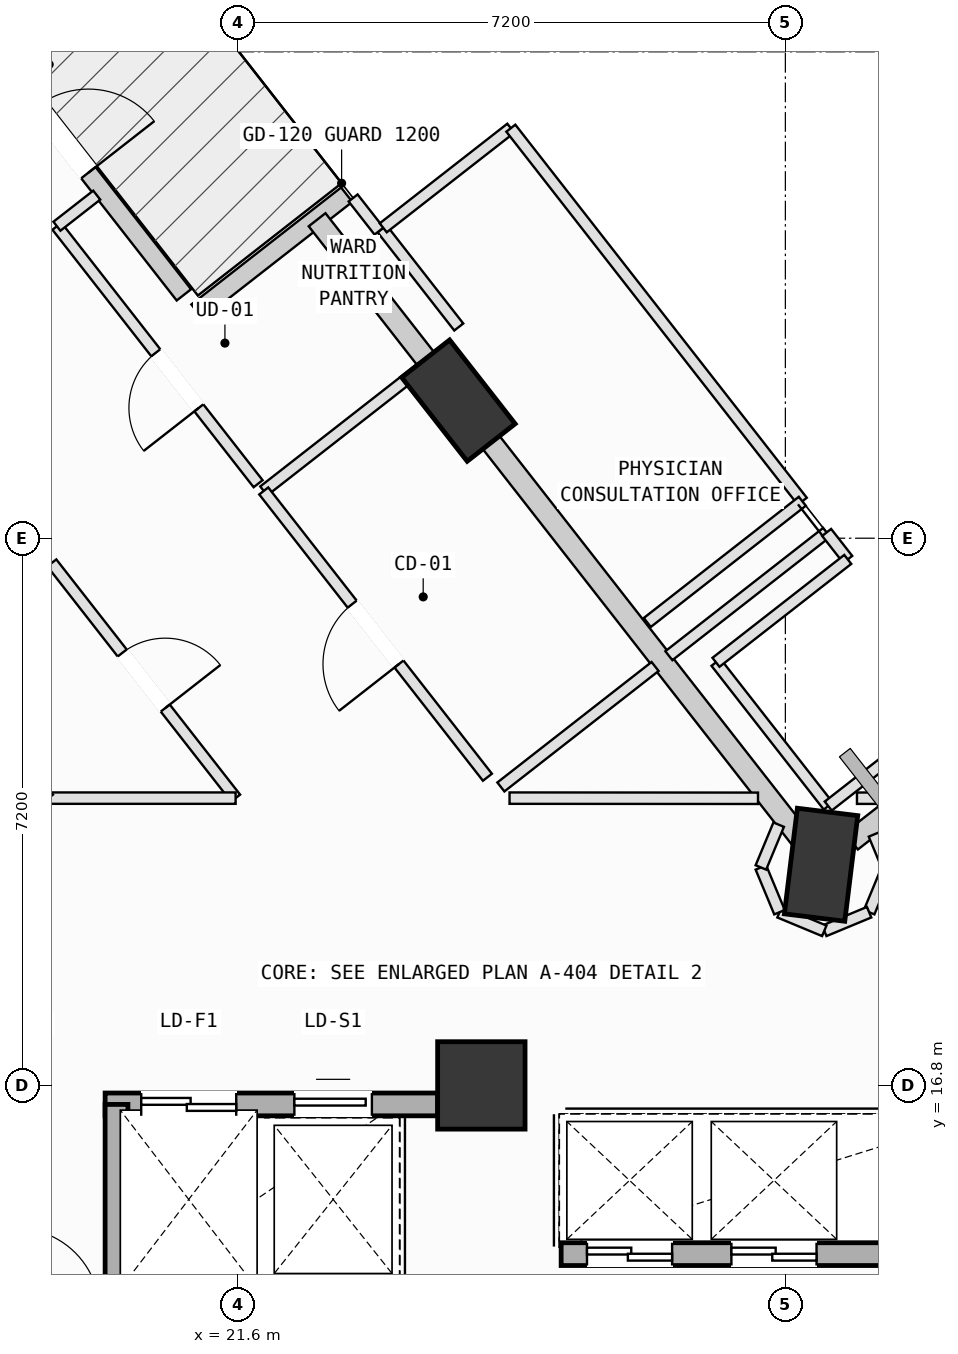
"""IFC4 building model, lengths in metres.
Left out: names, types, materials, properties, quantities, classifications, styles, units other than length and angle.
Written with IfcOpenShell. Run it as: python <this file> out.ifc"""

import sys

from ifc_helpers import new_model, si_unit, direction, frame, frame_2d, origin, origin_2d, place, context, subcontext, project, spatial, rectangle, extrude, element, fill, save


model = new_model("IFC4")
c1 = context("Model", 3, precision=1e-05, world=origin(), true_north=direction((0.0, 1.0)))
c2 = subcontext(c1, "Body", "Model", "MODEL_VIEW")
j1 = project(units=[si_unit("LENGTHUNIT", "METRE"), si_unit("PLANEANGLEUNIT", "RADIAN")], contexts=[c1])
p1 = place(None, origin())
s1 = spatial("IfcSite", under=j1, at=p1, CompositionType="ELEMENT")
p2 = place(p1, origin())
s2 = spatial("IfcBuilding", under=s1, at=p2, CompositionType="ELEMENT")
p3 = place(p2, frame((0.0, 0.0, 185.8)))
s3 = spatial("IfcBuildingStorey", under=s2, at=p3, CompositionType="ELEMENT", Elevation=185.8)
p4 = place(p3, frame((24.8, 16.8, 0.0), z_axis=(0.0, 0.0, 1.0), x_axis=(1.0, 0.0, 0.0)))
e1 = element("IfcColumn", 1, at=p4, inside=s3, PredefinedType="COLUMN", context=c2, shape_type="SweptSolid", body=[
    extrude(rectangle(XDim=1.15, YDim=1.15, at=origin_2d()), origin(), (0.0, 0.0, 1.0), 4.0),
])
p5 = place(p3, frame((29.27, 19.704, 0.002), z_axis=(0.021251539031, -0.0177706835, 0.999616213802), x_axis=(-0.682948414235, 0.729948927181, 0.027495948803)))
e2 = element("IfcColumn", 2, at=p5, inside=s3, PredefinedType="COLUMN", context=c2, shape_type="SweptSolid", body=[
    extrude(rectangle(XDim=1.4, YDim=0.8, at=origin_2d()), origin(), (0.0, 0.0, 1.0), 3.998),
])
p6 = place(p3, frame((24.498, 25.811, 0.002), z_axis=(-0.003845969984, -0.037727134127, 0.99928067722), x_axis=(-0.532627653931, 0.845821943945, 0.029883463813)))
e3 = element("IfcColumn", 3, at=p6, inside=s3, PredefinedType="COLUMN", context=c2, shape_type="SweptSolid", body=[
    extrude(rectangle(XDim=1.4, YDim=0.8, at=origin_2d()), origin(), (0.0, 0.0, 1.0), 3.999),
])
p7 = place(p3, frame((16.601, 32.686, 0.0), z_axis=(0.0, 0.0, 1.0), x_axis=(0.615648806913, -0.788020651091, 0.0)))
e4 = element("IfcWall", 4, at=p7, inside=s3, PredefinedType="SOLIDWALL", context=c2, shape_type="SweptSolid", body=[
    extrude(rectangle(XDim=6.96, YDim=0.24, at=frame_2d((3.48, 0.0))), origin(), (0.0, 0.0, 1.0), 3.265),
])
p8 = place(p7, frame((3.82, 0.0, 0.0)))
e5 = element("IfcOpeningElement", 5, at=p8, cuts=e4, PredefinedType="OPENING", context=c2, shape_type="SweptSolid", body=[
    extrude(rectangle(XDim=1.1, YDim=2.15, at=frame_2d((0.55, 1.075))), frame((0.0, 0.13, 0.0), z_axis=(0.0, -1.0, 0.0), x_axis=(1.0, 0.0, 0.0)), (0.0, 0.0, 1.0), 0.26),
])
p9 = place(p3, frame((21.059, 26.981, 0.0), z_axis=(0.0, 0.0, 1.0), x_axis=(0.788019931913, 0.615649727448, 0.0)))
e6 = element("IfcWall", 6, at=p9, inside=s3, PredefinedType="SOLIDWALL", context=c2, shape_type="SweptSolid", body=[
    extrude(rectangle(XDim=2.5, YDim=0.24, at=frame_2d((1.25, 0.0))), origin(), (0.0, 0.0, 1.0), 3.265),
])
p10 = place(p3, frame((29.667, 20.014, 0.0), z_axis=(0.0, 0.0, 1.0), x_axis=(0.788002637329, 0.615671863547, 0.0)))
e7 = element("IfcWall", 7, at=p10, inside=s3, PredefinedType="SOLIDWALL", context=c2, shape_type="SweptSolid", body=[
    extrude(rectangle(XDim=5.96, YDim=0.28, at=frame_2d((2.98, 0.0))), origin(), (0.0, 0.0, 1.0), 3.265),
])
p11 = place(p3, frame((28.998, 20.052, 0.0), z_axis=(0.0, 0.0, 1.0), x_axis=(-0.615664366432, 0.788008494819, 0.0)))
e8 = element("IfcWall", 8, at=p11, inside=s3, PredefinedType="SOLIDWALL", context=c2, shape_type="SweptSolid", body=[
    extrude(rectangle(XDim=6.76, YDim=0.28, at=frame_2d((3.38, 0.0))), origin(), (0.0, 0.0, 1.0), 3.265),
])
p12 = place(p3, frame((24.228, 26.156, 0.0), z_axis=(0.0, 0.0, 1.0), x_axis=(-0.615726632645, 0.787959842791, 0.0)))
e9 = element("IfcWall", 9, at=p12, inside=s3, PredefinedType="SOLIDWALL", context=c2, shape_type="SweptSolid", body=[
    extrude(rectangle(XDim=2.581, YDim=0.28, at=frame_2d((1.291, 0.0))), origin(), (0.0, 0.0, 1.0), 3.245),
])
p13 = place(p3, frame((19.85, 16.55, 0.0), z_axis=(0.0, 0.0, 1.0), x_axis=(1.0, 0.0, 0.0)))
e10 = element("IfcWall", 10, at=p13, inside=s3, PredefinedType="SOLIDWALL", context=c2, shape_type="SweptSolid", body=[
    extrude(rectangle(XDim=4.375, YDim=0.3, at=frame_2d((2.188, 0.0))), origin(), (0.0, 0.0, 1.0), 3.78),
])
p14 = place(p13, frame((0.475, 0.0, 0.0)))
e11 = element("IfcOpeningElement", 11, at=p14, cuts=e10, PredefinedType="OPENING", context=c2, shape_type="SweptSolid", body=[
    extrude(rectangle(XDim=1.25, YDim=2.18, at=frame_2d((0.625, 1.09))), frame((0.0, 0.16, 0.0), z_axis=(0.0, -1.0, 0.0), x_axis=(1.0, 0.0, 0.0)), (0.0, 0.0, 1.0), 0.32),
])
p15 = place(p13, frame((2.49, 0.0, 0.0)))
e12 = element("IfcOpeningElement", 12, at=p15, cuts=e10, PredefinedType="OPENING", context=c2, shape_type="SweptSolid", body=[
    extrude(rectangle(XDim=1.02, YDim=2.12, at=frame_2d((0.51, 1.06))), frame((0.0, 0.16, 0.0), z_axis=(0.0, -1.0, 0.0), x_axis=(1.0, 0.0, 0.0)), (0.0, 0.0, 1.0), 0.32),
])
p16 = place(p3, frame((20.0, 13.82, 0.0), z_axis=(0.0, 0.0, 1.0), x_axis=(0.0, 1.0, 0.0)))
e13 = element("IfcWall", 13, at=p16, inside=s3, PredefinedType="SOLIDWALL", context=c2, shape_type="SweptSolid", body=[
    extrude(rectangle(XDim=2.73, YDim=0.3, at=frame_2d((1.365, 0.0))), origin(), (0.0, 0.0, 1.0), 3.78),
])
p17 = place(p3, frame((25.85, 14.58, 0.0), z_axis=(0.0, 0.0, 1.0), x_axis=(1.0, 0.0, 0.0)))
e14 = element("IfcWall", 14, at=p17, inside=s3, PredefinedType="SOLIDWALL", context=c2, shape_type="SweptSolid", body=[
    extrude(rectangle(XDim=5.45, YDim=0.3, at=frame_2d((2.725, 0.0))), origin(), (0.0, 0.0, 1.0), 3.78),
])
p18 = place(p17, frame((0.34, 0.0, 0.0)))
e15 = element("IfcOpeningElement", 15, at=p18, cuts=e14, PredefinedType="OPENING", context=c2, shape_type="SweptSolid", body=[
    extrude(rectangle(XDim=1.12, YDim=2.15, at=frame_2d((0.56, 1.075))), frame((0.0, 0.16, 0.0), z_axis=(0.0, -1.0, 0.0), x_axis=(1.0, 0.0, 0.0)), (0.0, 0.0, 1.0), 0.32),
])
p19 = place(p17, frame((2.24, 0.0, 0.0)))
e16 = element("IfcOpeningElement", 16, at=p19, cuts=e14, PredefinedType="OPENING", context=c2, shape_type="SweptSolid", body=[
    extrude(rectangle(XDim=1.12, YDim=2.15, at=frame_2d((0.56, 1.075))), frame((0.0, 0.16, 0.0), z_axis=(0.0, -1.0, 0.0), x_axis=(1.0, 0.0, 0.0)), (0.0, 0.0, 1.0), 0.32),
])
p20 = place(p3, frame((27.887, 22.367, 0.0), z_axis=(0.0, 0.0, 1.0), x_axis=(0.615594676938, -0.788062937667, 0.0)))
e17 = element("IfcWall", 17, at=p20, inside=s3, PredefinedType="PARTITIONING", context=c2, shape_type="SweptSolid", body=[
    extrude(rectangle(XDim=2.399, YDim=0.15, at=frame_2d((1.2, 0.0))), origin(), (0.0, 0.0, 1.0), 3.78),
])
p21 = place(p3, frame((29.364, 20.476, 0.0), z_axis=(0.0, 0.0, 1.0), x_axis=(0.788027038921, 0.615640630505, 0.0)))
e18 = element("IfcWall", 18, at=p21, inside=s3, PredefinedType="PARTITIONING", context=c2, shape_type="SweptSolid", body=[
    extrude(rectangle(XDim=6.944, YDim=0.15, at=frame_2d((3.472, 0.0))), origin(), (0.0, 0.0, 1.0), 3.78),
])
p22 = place(p3, frame((30.204, 20.579, 0.0), z_axis=(0.0, 0.0, 1.0), x_axis=(-1.0, 0.0, 0.0)))
e19 = element("IfcWall", 19, at=p22, inside=s3, PredefinedType="PARTITIONING", context=c2, shape_type="SweptSolid", body=[
    extrude(rectangle(XDim=0.462, YDim=0.15, at=frame_2d((0.231, 0.0))), origin(), (0.0, 0.0, 1.0), 3.78),
])
p23 = place(p3, frame((29.966, 20.102, 0.0), z_axis=(0.0, 0.0, 1.0), x_axis=(0.382917701472, -0.923782460268, 0.0)))
e20 = element("IfcWall", 20, at=p23, inside=s3, PredefinedType="PARTITIONING", context=c2, shape_type="SweptSolid", body=[
    extrude(rectangle(XDim=0.47, YDim=0.15, at=frame_2d((0.235, 0.0))), origin(), (0.0, 0.0, 1.0), 3.78),
])
p24 = place(p3, frame((30.146, 19.668, 0.0), z_axis=(0.0, 0.0, 1.0), x_axis=(-0.382656259044, -0.923890787601, 0.0)))
e21 = element("IfcWall", 21, at=p24, inside=s3, PredefinedType="PARTITIONING", context=c2, shape_type="SweptSolid", body=[
    extrude(rectangle(XDim=0.637, YDim=0.15, at=frame_2d((0.319, 0.0))), origin(), (0.0, 0.0, 1.0), 3.78),
])
p25 = place(p3, frame((29.902, 19.079, 0.0), z_axis=(0.0, 0.0, 1.0), x_axis=(-0.923494633817, -0.383611341478, 0.0)))
e22 = element("IfcWall", 22, at=p25, inside=s3, PredefinedType="PARTITIONING", context=c2, shape_type="SweptSolid", body=[
    extrude(rectangle(XDim=0.639, YDim=0.15, at=frame_2d((0.319, 0.0))), origin(), (0.0, 0.0, 1.0), 3.415),
])
p26 = place(p3, frame((29.312, 18.834, 0.0), z_axis=(0.0, 0.0, 1.0), x_axis=(-0.92326925104, 0.384153472045, 0.0)))
e23 = element("IfcWall", 23, at=p26, inside=s3, PredefinedType="PARTITIONING", context=c2, shape_type="SweptSolid", body=[
    extrude(rectangle(XDim=0.638, YDim=0.15, at=frame_2d((0.319, 0.0))), origin(), (0.0, 0.0, 1.0), 3.78),
])
p27 = place(p3, frame((28.723, 19.079, 0.0), z_axis=(0.0, 0.0, 1.0), x_axis=(-0.383962918333, 0.92334851348, 0.0)))
e24 = element("IfcWall", 24, at=p27, inside=s3, PredefinedType="PARTITIONING", context=c2, shape_type="SweptSolid", body=[
    extrude(rectangle(XDim=0.638, YDim=0.15, at=frame_2d((0.319, 0.0))), origin(), (0.0, 0.0, 1.0), 3.78),
])
p28 = place(p3, frame((28.478, 19.668, 0.0), z_axis=(0.0, 0.0, 1.0), x_axis=(0.383648363286, 0.923479254422, 0.0)))
e25 = element("IfcWall", 25, at=p28, inside=s3, PredefinedType="PARTITIONING", context=c2, shape_type="SweptSolid", body=[
    extrude(rectangle(XDim=0.61, YDim=0.15, at=frame_2d((0.305, 0.0))), origin(), (0.0, 0.0, 1.0), 3.78),
])
p29 = place(p3, frame((28.44, 20.578, 0.0), z_axis=(0.0, 0.0, 1.0), x_axis=(-0.999999774112, 0.000672143239, 0.0)))
e26 = element("IfcWall", 26, at=p29, inside=s3, PredefinedType="PARTITIONING", context=c2, shape_type="SweptSolid", body=[
    extrude(rectangle(XDim=3.269, YDim=0.15, at=frame_2d((1.635, 0.0))), origin(), (0.0, 0.0, 1.0), 3.78),
])
p30 = place(p3, frame((25.057, 20.727, 0.0), z_axis=(0.0, 0.0, 1.0), x_axis=(0.788068936461, 0.615586997414, 0.0)))
e27 = element("IfcWall", 27, at=p30, inside=s3, PredefinedType="PARTITIONING", context=c2, shape_type="SweptSolid", body=[
    extrude(rectangle(XDim=2.575, YDim=0.15, at=frame_2d((1.287, 0.0))), origin(), (0.0, 0.0, 1.0), 3.78),
])
p31 = place(p3, frame((27.267, 22.454, 0.0), z_axis=(0.0, 0.0, 1.0), x_axis=(0.788022968691, 0.615645840411, 0.0)))
e28 = element("IfcWall", 28, at=p31, inside=s3, PredefinedType="PARTITIONING", context=c2, shape_type="SweptSolid", body=[
    extrude(rectangle(XDim=2.634, YDim=0.15, at=frame_2d((1.317, 0.0))), origin(), (0.0, 0.0, 1.0), 3.78),
])
p32 = place(p3, frame((29.343, 24.076, 0.0), z_axis=(0.0, 0.0, 1.0), x_axis=(0.616673159564, -0.787219292366, 0.0)))
e29 = element("IfcWall", 29, at=p32, inside=s3, PredefinedType="PARTITIONING", context=c2, shape_type="SweptSolid", body=[
    extrude(rectangle(XDim=0.451, YDim=0.15, at=frame_2d((0.226, 0.0))), origin(), (0.0, 0.0, 1.0), 3.78),
])
p33 = place(p3, frame((29.621, 23.721, 0.0), z_axis=(0.0, 0.0, 1.0), x_axis=(-0.788197623087, -0.615422218449, 0.0)))
e30 = element("IfcWall", 30, at=p33, inside=s3, PredefinedType="PARTITIONING", context=c2, shape_type="SweptSolid", body=[
    extrude(rectangle(XDim=2.2, YDim=0.15, at=frame_2d((1.1, 0.0))), origin(), (0.0, 0.0, 1.0), 3.78),
])
p34 = place(p3, frame((21.937, 24.622, 0.0), z_axis=(0.0, 0.0, 1.0), x_axis=(0.788163411112, 0.615466032681, 0.0)))
e31 = element("IfcWall", 31, at=p34, inside=s3, PredefinedType="PARTITIONING", context=c2, shape_type="SweptSolid", body=[
    extrude(rectangle(XDim=2.635, YDim=0.15, at=frame_2d((1.317, 0.0))), origin(), (0.0, 0.0, 1.0), 3.78),
])
p35 = place(p3, frame((24.88, 20.855, 0.0), z_axis=(0.0, 0.0, 1.0), x_axis=(-0.61562223779, 0.788041407756, 0.0)))
e32 = element("IfcWall", 32, at=p35, inside=s3, PredefinedType="PARTITIONING", context=c2, shape_type="SweptSolid", body=[
    extrude(rectangle(XDim=4.78, YDim=0.15, at=frame_2d((2.39, 0.0))), origin(), (0.0, 0.0, 1.0), 3.415),
])
p36 = place(p35, frame((1.89, 0.0, 0.0)))
e33 = element("IfcOpeningElement", 33, at=p36, cuts=e32, PredefinedType="OPENING", context=c2, shape_type="SweptSolid", body=[
    extrude(rectangle(XDim=1.0, YDim=2.12, at=frame_2d((0.5, 1.06))), frame((0.0, 0.085, 0.0), z_axis=(0.0, -1.0, 0.0), x_axis=(1.0, 0.0, 0.0)), (0.0, 0.0, 1.0), 0.17),
])
p37 = place(p3, frame((23.494, 28.071, 0.0), z_axis=(0.0, 0.0, 1.0), x_axis=(0.615516872189, -0.788123708596, 0.0)))
e34 = element("IfcWall", 34, at=p37, inside=s3, PredefinedType="PARTITIONING", context=c2, shape_type="SweptSolid", body=[
    extrude(rectangle(XDim=1.639, YDim=0.15, at=frame_2d((0.82, 0.0))), origin(), (0.0, 0.0, 1.0), 3.78),
])
p38 = place(p3, frame((21.863, 24.717, 0.0), z_axis=(0.0, 0.0, 1.0), x_axis=(-0.615664978925, 0.788008016283, 0.0)))
e35 = element("IfcWall", 35, at=p38, inside=s3, PredefinedType="PARTITIONING", context=c2, shape_type="SweptSolid", body=[
    extrude(rectangle(XDim=4.299, YDim=0.15, at=frame_2d((2.15, 0.0))), origin(), (0.0, 0.0, 1.0), 3.78),
])
p39 = place(p38, frame((1.267, 0.0, 0.0)))
e36 = element("IfcOpeningElement", 36, at=p39, cuts=e35, PredefinedType="OPENING", context=c2, shape_type="SweptSolid", body=[
    extrude(rectangle(XDim=0.92, YDim=2.1, at=frame_2d((0.46, 1.05))), frame((0.0, 0.085, 0.0), z_axis=(0.0, -1.0, 0.0), x_axis=(1.0, 0.0, 0.0)), (0.0, 0.0, 1.0), 0.17),
])
p40 = place(p3, frame((19.216, 28.105, 0.0), z_axis=(0.0, 0.0, 1.0), x_axis=(0.78830274662, 0.615287558522, 0.0)))
e37 = element("IfcWall", 37, at=p40, inside=s3, PredefinedType="PARTITIONING", context=c2, shape_type="SweptSolid", body=[
    extrude(rectangle(XDim=0.665, YDim=0.15, at=frame_2d((0.332, 0.0))), origin(), (0.0, 0.0, 1.0), 3.78),
])
p41 = place(p3, frame((23.113, 28.477, 0.0), z_axis=(0.0, 0.0, 1.0), x_axis=(0.616106085267, -0.78766318417, 0.0)))
e38 = element("IfcWall", 38, at=p41, inside=s3, PredefinedType="PARTITIONING", context=c2, shape_type="SweptSolid", body=[
    extrude(rectangle(XDim=0.553, YDim=0.15, at=frame_2d((0.277, 0.0))), origin(), (0.0, 0.0, 1.0), 3.78),
])
p42 = place(p3, frame((19.149, 23.675, 0.0), z_axis=(0.0, 0.0, 1.0), x_axis=(0.615647660829, -0.788021546479, 0.0)))
e39 = element("IfcWall", 39, at=p42, inside=s3, PredefinedType="PARTITIONING", context=c2, shape_type="SweptSolid", body=[
    extrude(rectangle(XDim=3.927, YDim=0.15, at=frame_2d((1.964, 0.0))), origin(), (0.0, 0.0, 1.0), 3.78),
])
p43 = place(p42, frame((1.504, 0.0, 0.0)))
e40 = element("IfcOpeningElement", 40, at=p43, cuts=e39, PredefinedType="OPENING", context=c2, shape_type="SweptSolid", body=[
    extrude(rectangle(XDim=0.92, YDim=2.1, at=frame_2d((0.46, 1.05))), frame((0.0, 0.085, 0.0), z_axis=(0.0, -1.0, 0.0), x_axis=(1.0, 0.0, 0.0)), (0.0, 0.0, 1.0), 0.17),
])
p44 = place(p3, frame((21.567, 20.58, 0.0), z_axis=(0.0, 0.0, 1.0), x_axis=(-1.0, 0.0, 0.0)))
e41 = element("IfcWall", 41, at=p44, inside=s3, PredefinedType="PARTITIONING", context=c2, shape_type="SweptSolid", body=[
    extrude(rectangle(XDim=2.462, YDim=0.15, at=frame_2d((1.231, 0.0))), origin(), (0.0, 0.0, 1.0), 3.78),
])
p45 = place(p3, frame((19.105, 20.58, 0.0), z_axis=(0.0, 0.0, 1.0), x_axis=(-0.615451869475, 0.788174470761, 0.0)))
e42 = element("IfcWall", 42, at=p45, inside=s3, PredefinedType="PARTITIONING", context=c2, shape_type="SweptSolid", body=[
    extrude(rectangle(XDim=2.392, YDim=0.15, at=frame_2d((1.196, 0.0))), origin(), (0.0, 0.0, 1.0), 3.78),
])
p46 = place(p3, frame((23.509, 28.084, 0.0), z_axis=(0.0, 0.0, 1.0), x_axis=(0.788172044174, 0.615454977056, 0.0)))
e43 = element("IfcWall", 43, at=p46, inside=s3, PredefinedType="PARTITIONING", context=c2, shape_type="SweptSolid", body=[
    extrude(rectangle(XDim=2.13, YDim=0.15, at=frame_2d((1.065, 0.0))), origin(), (0.0, 0.0, 1.0), 3.78),
])
p47 = place(p3, frame((25.188, 29.395, 0.0), z_axis=(0.0, 0.0, 1.0), x_axis=(0.615629591414, -0.78803566301, 0.0)))
e44 = element("IfcWall", 44, at=p47, inside=s3, PredefinedType="PARTITIONING", context=c2, shape_type="SweptSolid", body=[
    extrude(rectangle(XDim=6.229, YDim=0.15, at=frame_2d((3.115, 0.0))), origin(), (0.0, 0.0, 1.0), 3.78),
])
p48 = place(p3, frame((29.023, 24.486, 0.0), z_axis=(0.0, 0.0, 1.0), x_axis=(-0.787801343925, -0.615929413578, 0.0)))
e45 = element("IfcWall", 45, at=p48, inside=s3, PredefinedType="PARTITIONING", context=c2, shape_type="SweptSolid", body=[
    extrude(rectangle(XDim=2.59, YDim=0.15, at=frame_2d((1.295, 0.0))), origin(), (0.0, 0.0, 1.0), 3.78),
])
p49 = place(p8, origin())
e46 = element("IfcDoor", 46, at=p49, inside=s3, OperationType="SINGLE_SWING_RIGHT", PredefinedType="DOOR", context=c2, shape_type="SweptSolid", body=[
    extrude(rectangle(XDim=1.1, YDim=2.15, at=frame_2d((0.55, 1.075))), frame((0.0, 0.025, 0.0), z_axis=(0.0, -1.0, 0.0), x_axis=(1.0, 0.0, 0.0)), (0.0, 0.0, 1.0), 0.05),
])
fill(e5, e46)
p50 = place(p18, origin())
e47 = element("IfcDoor", 47, at=p50, inside=s3, OperationType="DOUBLE_DOOR_SLIDING", PredefinedType="DOOR", context=c2, shape_type="SweptSolid", body=[
    extrude(rectangle(XDim=1.12, YDim=2.15, at=frame_2d((0.56, 1.075))), frame((0.0, 0.025, 0.0), z_axis=(0.0, -1.0, 0.0), x_axis=(1.0, 0.0, 0.0)), (0.0, 0.0, 1.0), 0.05),
])
fill(e15, e47)
p51 = place(p19, origin())
e48 = element("IfcDoor", 48, at=p51, inside=s3, OperationType="DOUBLE_DOOR_SLIDING", PredefinedType="DOOR", context=c2, shape_type="SweptSolid", body=[
    extrude(rectangle(XDim=1.12, YDim=2.15, at=frame_2d((0.56, 1.075))), frame((0.0, 0.025, 0.0), z_axis=(0.0, -1.0, 0.0), x_axis=(1.0, 0.0, 0.0)), (0.0, 0.0, 1.0), 0.05),
])
fill(e16, e48)
p52 = place(p14, origin())
e49 = element("IfcDoor", 49, at=p52, inside=s3, OperationType="DOUBLE_DOOR_SLIDING", PredefinedType="DOOR", context=c2, shape_type="SweptSolid", body=[
    extrude(rectangle(XDim=1.25, YDim=2.18, at=frame_2d((0.625, 1.09))), frame((0.0, 0.025, 0.0), z_axis=(0.0, -1.0, 0.0), x_axis=(1.0, 0.0, 0.0)), (0.0, 0.0, 1.0), 0.05),
])
fill(e11, e49)
p53 = place(p15, origin())
e50 = element("IfcDoor", 50, at=p53, inside=s3, OperationType="SLIDING_TO_LEFT", PredefinedType="DOOR", context=c2, shape_type="SweptSolid", body=[
    extrude(rectangle(XDim=1.02, YDim=2.12, at=frame_2d((0.51, 1.06))), frame((0.0, 0.025, 0.0), z_axis=(0.0, -1.0, 0.0), x_axis=(1.0, 0.0, 0.0)), (0.0, 0.0, 1.0), 0.05),
])
fill(e12, e50)
p54 = place(p36, origin())
e51 = element("IfcDoor", 51, at=p54, inside=s3, OperationType="SINGLE_SWING_LEFT", PredefinedType="DOOR", context=c2, shape_type="SweptSolid", body=[
    extrude(rectangle(XDim=1.0, YDim=2.12, at=frame_2d((0.5, 1.06))), frame((0.0, 0.025, 0.0), z_axis=(0.0, -1.0, 0.0), x_axis=(1.0, 0.0, 0.0)), (0.0, 0.0, 1.0), 0.05),
])
fill(e33, e51)
p55 = place(p39, origin())
e52 = element("IfcDoor", 52, at=p55, inside=s3, OperationType="SINGLE_SWING_LEFT", PredefinedType="DOOR", context=c2, shape_type="SweptSolid", body=[
    extrude(rectangle(XDim=0.92, YDim=2.1, at=frame_2d((0.46, 1.05))), frame((0.0, 0.025, 0.0), z_axis=(0.0, -1.0, 0.0), x_axis=(1.0, 0.0, 0.0)), (0.0, 0.0, 1.0), 0.05),
])
fill(e36, e52)
p56 = place(p43, origin())
e53 = element("IfcDoor", 53, at=p56, inside=s3, OperationType="SINGLE_SWING_RIGHT", PredefinedType="DOOR", context=c2, shape_type="SweptSolid", body=[
    extrude(rectangle(XDim=0.92, YDim=2.1, at=frame_2d((0.46, 1.05))), frame((0.0, 0.025, 0.0), z_axis=(0.0, -1.0, 0.0), x_axis=(1.0, 0.0, 0.0)), (0.0, 0.0, 1.0), 0.05),
])
fill(e40, e53)
save(model, sys.argv[1])
